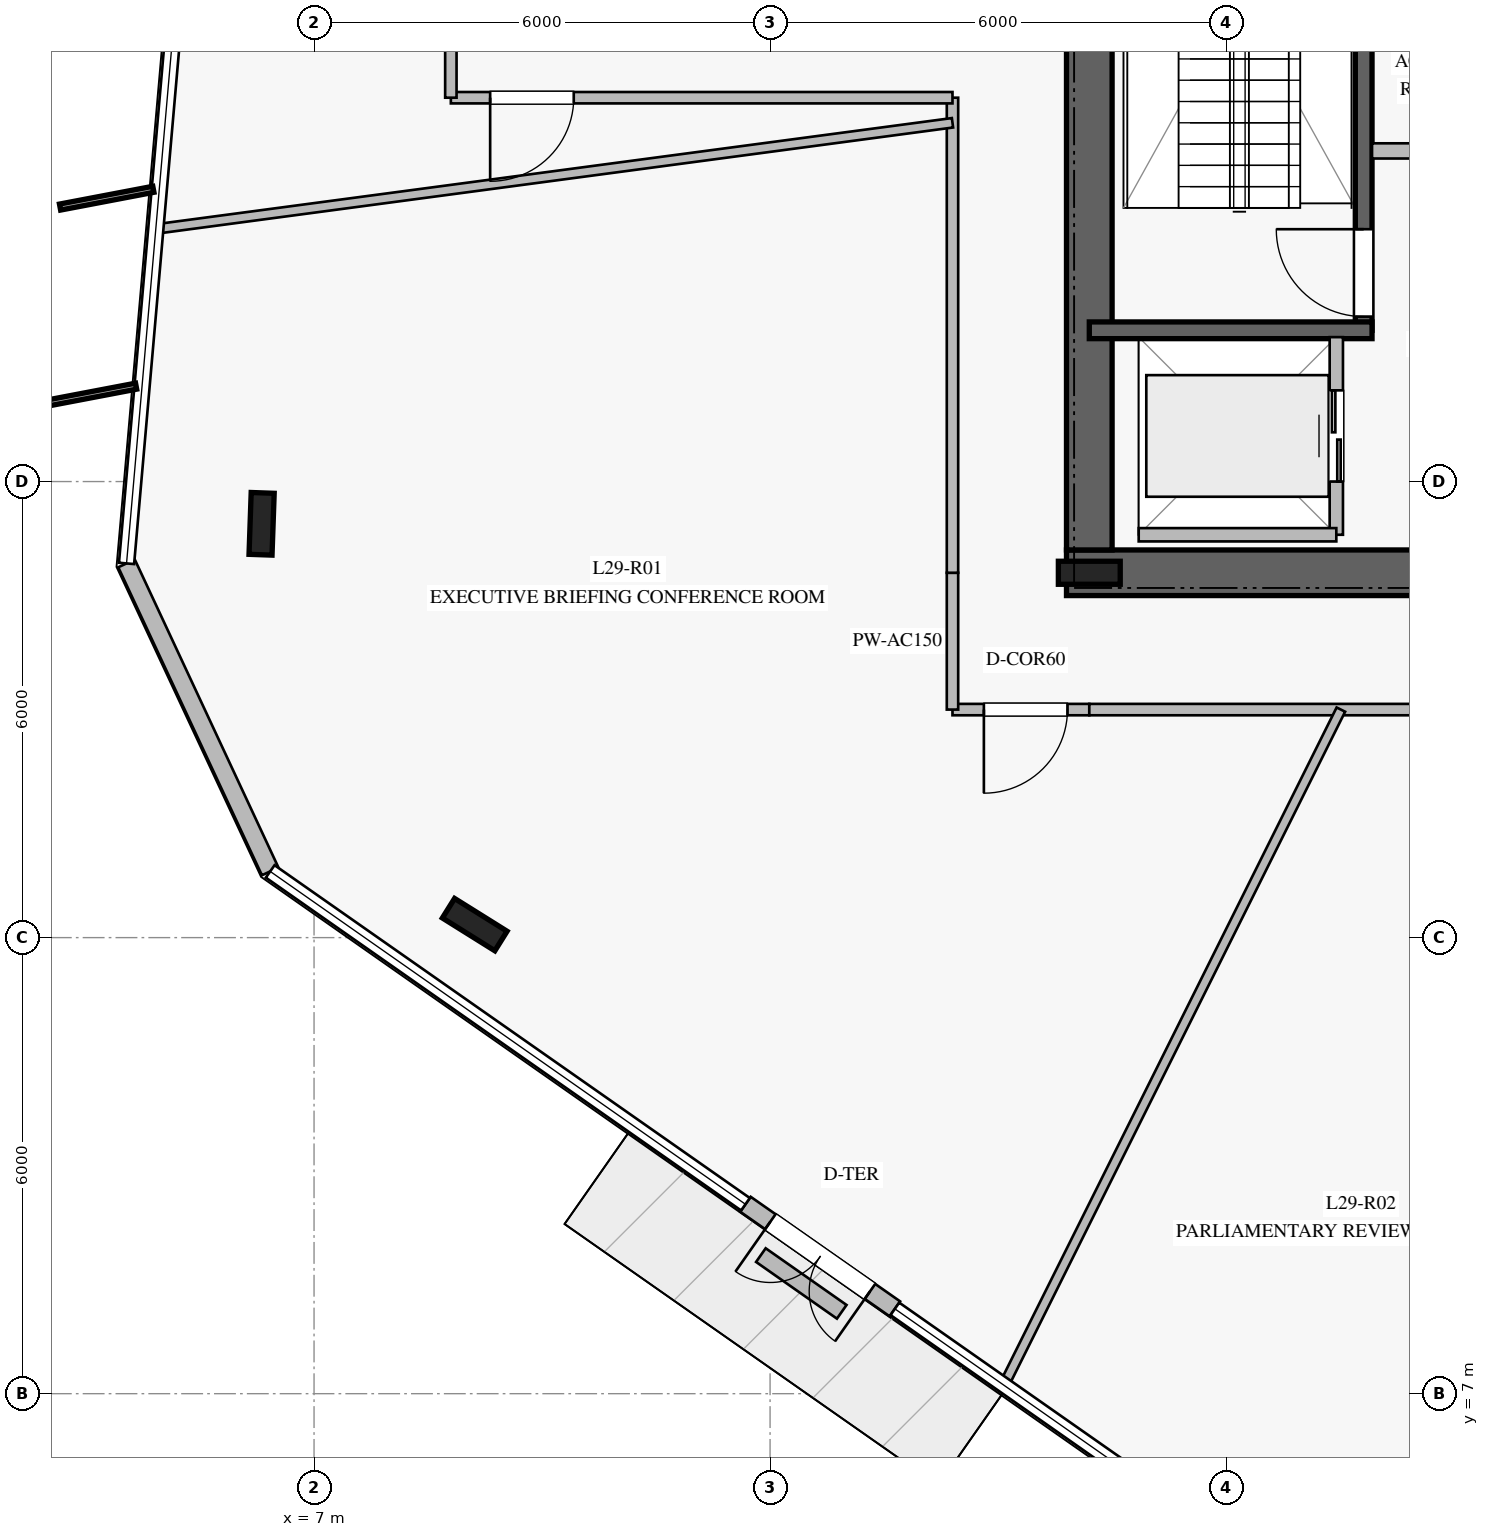
"""IFC4 building model, lengths in metres.
Left out: names, types, materials, properties, quantities, classifications, styles, units other than length and angle.
Written with IfcOpenShell. Run it as: python <this file> out.ifc"""

import sys

from ifc_helpers import new_model, si_unit, direction, frame, frame_2d, origin, origin_2d, place, context, subcontext, project, spatial, rectangle, i_section, extrude, element, fill, save


model = new_model("IFC4")
c1 = context("Model", 3, precision=1e-05, world=origin(), true_north=direction((0.0, 1.0)))
c2 = subcontext(c1, "Body", "Model", "MODEL_VIEW")
j1 = project(units=[si_unit("LENGTHUNIT", "METRE"), si_unit("PLANEANGLEUNIT", "RADIAN")], contexts=[c1])
p1 = place(None, origin())
s1 = spatial("IfcSite", under=j1, at=p1, CompositionType="ELEMENT")
p2 = place(p1, origin())
s2 = spatial("IfcBuilding", under=s1, at=p2, CompositionType="ELEMENT")
p3 = place(p2, frame((0.0, 0.0, 122.4)))
s3 = spatial("IfcBuildingStorey", under=s2, at=p3, CompositionType="ELEMENT", Elevation=122.4)
p4 = place(p3, frame((16.9, 17.8, 0.0), z_axis=(0.0, 0.0, 1.0), x_axis=(1.0, 0.0, 0.0)))
e1 = element("IfcWall", 1, at=p4, inside=s3, PredefinedType="SHEAR", context=c2, shape_type="SweptSolid", body=[
    extrude(rectangle(XDim=16.2, YDim=0.6, at=frame_2d((8.1, 0.0))), origin(), (0.0, 0.0, 1.0), 3.76),
])
p5 = place(p4, frame((5.05, 0.0, 0.0)))
e2 = element("IfcOpeningElement", 2, at=p5, cuts=e1, PredefinedType="OPENING", context=c2, shape_type="SweptSolid", body=[
    extrude(rectangle(XDim=1.2, YDim=2.25, at=frame_2d((0.6, 1.125))), frame((0.0, 0.31, 0.0), z_axis=(0.0, -1.0, 0.0), x_axis=(1.0, 0.0, 0.0)), (0.0, 0.0, 1.0), 0.62),
])
p6 = place(p4, frame((10.95, 0.0, 0.0)))
e3 = element("IfcOpeningElement", 3, at=p6, cuts=e1, PredefinedType="OPENING", context=c2, shape_type="SweptSolid", body=[
    extrude(rectangle(XDim=1.1, YDim=2.2, at=frame_2d((0.55, 1.1))), frame((0.0, 0.31, 0.0), z_axis=(0.0, -1.0, 0.0), x_axis=(1.0, 0.0, 0.0)), (0.0, 0.0, 1.0), 0.62),
])
p7 = place(p3, frame((17.2, 31.9, 0.0), z_axis=(0.0, 0.0, 1.0), x_axis=(0.0, -1.0, 0.0)))
e4 = element("IfcWall", 4, at=p7, inside=s3, PredefinedType="SHEAR", context=c2, shape_type="SweptSolid", body=[
    extrude(rectangle(XDim=13.8, YDim=0.6, at=frame_2d((6.9, 0.0))), origin(), (0.0, 0.0, 1.0), 3.76),
])
p8 = place(p7, frame((2.05, 0.0, 0.0)))
e5 = element("IfcOpeningElement", 5, at=p8, cuts=e4, PredefinedType="OPENING", context=c2, shape_type="SweptSolid", body=[
    extrude(rectangle(XDim=1.5, YDim=2.2, at=frame_2d((0.75, 1.1))), frame((0.0, 0.31, 0.0), z_axis=(0.0, -1.0, 0.0), x_axis=(1.0, 0.0, 0.0)), (0.0, 0.0, 1.0), 0.62),
])
p9 = place(p3, frame((17.2, 17.8, 0.0), z_axis=(0.0, 0.0, 1.0), x_axis=(1.0, 0.0, 0.0)))
e6 = element("IfcColumn", 6, at=p9, inside=s3, PredefinedType="COLUMN", context=c2, shape_type="SweptSolid", body=[
    extrude(i_section(OverallWidth=0.303, OverallDepth=0.814, WebThickness=0.021, FlangeThickness=0.04, at=origin_2d()), origin(), (0.0, 0.0, 1.0), 4.0),
])
p10 = place(p3, frame((20.81, 20.99, 0.0), z_axis=(0.0, 0.0, 1.0), x_axis=(0.0, 1.0, 0.0)))
e7 = element("IfcWall", 7, at=p10, inside=s3, PredefinedType="SOLIDWALL", context=c2, shape_type="SweptSolid", body=[
    extrude(rectangle(XDim=7.22, YDim=0.22, at=frame_2d((3.61, 0.0))), origin(), (0.0, 0.0, 1.0), 3.76),
])
p11 = place(p10, frame((0.18, 0.0, 0.0)))
e8 = element("IfcOpeningElement", 8, at=p11, cuts=e7, PredefinedType="OPENING", context=c2, shape_type="SweptSolid", body=[
    extrude(rectangle(XDim=1.15, YDim=2.2, at=frame_2d((0.575, 1.1))), frame((0.0, 0.12, 0.0), z_axis=(0.0, -1.0, 0.0), x_axis=(1.0, 0.0, 0.0)), (0.0, 0.0, 1.0), 0.24),
])
p12 = place(p3, frame((17.2, 20.99, 0.0), z_axis=(0.0, 0.0, 1.0), x_axis=(1.0, 0.0, 0.0)))
e9 = element("IfcWall", 9, at=p12, inside=s3, PredefinedType="SOLIDWALL", context=c2, shape_type="SweptSolid", body=[
    extrude(rectangle(XDim=3.72, YDim=0.22, at=frame_2d((1.86, 0.0))), origin(), (0.0, 0.0, 1.0), 3.76),
])
for number, where, z_axis, x_axis in (
    (10, (6.31, 18.444, 0.0), (0.0, 0.0, 1.0), (0.035, 0.999, 0.0)),
    (11, (9.114, 13.171, 0.0), (0.0, 0.0, 1.0), (-0.848, 0.53, 0.0)),
):
    element("IfcColumn", number, at=place(p3, frame(where, z_axis=z_axis, x_axis=x_axis)), inside=s3, PredefinedType="COLUMN", context=c2, shape_type="SweptSolid", body=[
        extrude(i_section(OverallWidth=0.303, OverallDepth=0.814, WebThickness=0.021, FlangeThickness=0.04, at=origin_2d()), origin(), (0.0, 0.0, 1.0), 4.0),
    ])
p13 = place(p3, frame((4.533, 17.923, 0.0), z_axis=(0.0, 0.0, 1.0), x_axis=(0.422738987368, -0.906251481962, 0.0)))
e12 = element("IfcWall", 12, at=p13, inside=s3, PredefinedType="STANDARD", context=c2, shape_type="SweptSolid", body=[
    extrude(rectangle(XDim=4.471, YDim=0.24, at=frame_2d((2.236, 0.0))), origin(), (0.0, 0.0, 1.0), 3.76),
])
p14 = place(p3, frame((12.676, 9.492, 0.0), z_axis=(0.0, 0.0, 1.0), x_axis=(0.819284492344, -0.573387234428, 0.0)))
e13 = element("IfcWall", 13, at=p14, inside=s3, PredefinedType="STANDARD", context=c2, shape_type="SweptSolid", body=[
    extrude(rectangle(XDim=2.4, YDim=0.24, at=frame_2d((1.2, 0.0))), origin(), (0.0, 0.0, 1.0), 3.76),
])
p15 = place(p14, frame((0.4, 0.0, 0.0)))
e14 = element("IfcOpeningElement", 14, at=p15, cuts=e13, PredefinedType="OPENING", context=c2, shape_type="SweptSolid", body=[
    extrude(rectangle(XDim=1.6, YDim=2.25, at=frame_2d((0.8, 1.125))), frame((0.0, 0.13, 0.0), z_axis=(0.0, -1.0, 0.0), x_axis=(1.0, 0.0, 0.0)), (0.0, 0.0, 1.0), 0.26),
])
p16 = place(p3, frame((12.879, 8.823, 0.0), z_axis=(0.0, 0.0, 1.0), x_axis=(0.818816934098, -0.574054725993, 0.0)))
e15 = element("IfcWall", 15, at=p16, inside=s3, PredefinedType="USERDEFINED", context=c2, shape_type="SweptSolid", body=[
    extrude(rectangle(XDim=1.3, YDim=0.22, at=frame_2d((0.65, 0.0))), origin(), (0.0, 0.0, 1.0), 0.4),
])
p17 = place(p3, frame((20.92, 23.35, 0.0), z_axis=(0.0, 0.0, 1.0), x_axis=(1.0, 0.0, 0.0)))
e16 = element("IfcWall", 16, at=p17, inside=s3, PredefinedType="PARTITIONING", context=c2, shape_type="SweptSolid", body=[
    extrude(rectangle(XDim=3.38, YDim=0.2, at=frame_2d((1.69, 0.0))), origin(), (0.0, 0.0, 1.0), 3.76),
])
p18 = place(p3, frame((20.45, 18.3, 0.0), z_axis=(0.0, 0.0, 1.0), x_axis=(0.0, 1.0, 0.0)))
e17 = element("IfcWall", 17, at=p18, inside=s3, PredefinedType="PARTITIONING", context=c2, shape_type="SweptSolid", body=[
    extrude(rectangle(XDim=2.6, YDim=0.175, at=frame_2d((1.3, 0.0))), origin(), (0.0, 0.0, 1.0), 3.76),
])
p19 = place(p18, frame((0.7, 0.0, 0.0)))
e18 = element("IfcOpeningElement", 18, at=p19, cuts=e17, PredefinedType="OPENING", context=c2, shape_type="SweptSolid", body=[
    extrude(rectangle(XDim=1.2, YDim=2.2, at=frame_2d((0.6, 1.1))), frame((0.0, 0.098, 0.0), z_axis=(0.0, -1.0, 0.0), x_axis=(1.0, 0.0, 0.0)), (0.0, 0.0, 1.0), 0.195),
])
p20 = place(p3, frame((17.85, 18.3, 0.0), z_axis=(0.0, 0.0, 1.0), x_axis=(1.0, 0.0, 0.0)))
e19 = element("IfcWall", 19, at=p20, inside=s3, PredefinedType="PARTITIONING", context=c2, shape_type="SweptSolid", body=[
    extrude(rectangle(XDim=2.6, YDim=0.175, at=frame_2d((1.3, 0.0))), origin(), (0.0, 0.0, 1.0), 3.76),
])
p21 = place(p3, frame((17.2, 16.0, 0.0), z_axis=(0.0, 0.0, 1.0), x_axis=(-1.0, 0.0, 0.0)))
e20 = element("IfcWall", 20, at=p21, inside=s3, PredefinedType="PARTITIONING", context=c2, shape_type="SweptSolid", body=[
    extrude(rectangle(XDim=1.8, YDim=0.15, at=frame_2d((0.9, 0.0))), origin(), (0.0, 0.0, 1.0), 3.36),
])
p22 = place(p21, frame((0.287, 0.0, 0.0)))
e21 = element("IfcOpeningElement", 21, at=p22, cuts=e20, PredefinedType="OPENING", context=c2, shape_type="SweptSolid", body=[
    extrude(rectangle(XDim=1.1, YDim=2.2, at=frame_2d((0.55, 1.1))), frame((0.0, 0.085, 0.0), z_axis=(0.0, -1.0, 0.0), x_axis=(1.0, 0.0, 0.0)), (0.0, 0.0, 1.0), 0.17),
])
p23 = place(p3, frame((15.4, 16.0, 0.0), z_axis=(0.0, 0.0, 1.0), x_axis=(0.0, 1.0, 0.0)))
e22 = element("IfcWall", 22, at=p23, inside=s3, PredefinedType="PARTITIONING", context=c2, shape_type="SweptSolid", body=[
    extrude(rectangle(XDim=1.8, YDim=0.15, at=frame_2d((0.9, 0.0))), origin(), (0.0, 0.0, 1.0), 3.21),
])
p24 = place(p3, frame((15.4, 17.8, 0.0), z_axis=(0.0, 0.0, 1.0), x_axis=(0.0, 1.0, 0.0)))
e23 = element("IfcWall", 23, at=p24, inside=s3, PredefinedType="PARTITIONING", context=c2, shape_type="SweptSolid", body=[
    extrude(rectangle(XDim=6.25, YDim=0.15, at=frame_2d((3.125, 0.0))), origin(), (0.0, 0.0, 1.0), 3.21),
])
p25 = place(p3, frame((15.4, 24.05, 0.0), z_axis=(0.0, 0.0, 1.0), x_axis=(-1.0, 0.0, 0.0)))
e24 = element("IfcWall", 24, at=p25, inside=s3, PredefinedType="PARTITIONING", context=c2, shape_type="SweptSolid", body=[
    extrude(rectangle(XDim=6.6, YDim=0.15, at=frame_2d((3.3, 0.0))), origin(), (0.0, 0.0, 1.0), 3.05),
])
p26 = place(p25, frame((4.983, 0.0, 0.0)))
e25 = element("IfcOpeningElement", 25, at=p26, cuts=e24, PredefinedType="OPENING", context=c2, shape_type="SweptSolid", body=[
    extrude(rectangle(XDim=1.1, YDim=2.2, at=frame_2d((0.55, 1.1))), frame((0.0, 0.085, 0.0), z_axis=(0.0, -1.0, 0.0), x_axis=(1.0, 0.0, 0.0)), (0.0, 0.0, 1.0), 0.17),
])
p27 = place(p3, frame((8.8, 24.05, 0.0), z_axis=(0.0, 0.0, 1.0), x_axis=(0.0, 1.0, 0.0)))
e26 = element("IfcWall", 26, at=p27, inside=s3, PredefinedType="PARTITIONING", context=c2, shape_type="SweptSolid", body=[
    extrude(rectangle(XDim=1.9, YDim=0.15, at=frame_2d((0.95, 0.0))), origin(), (0.0, 0.0, 1.0), 3.3),
])
p28 = place(p3, frame((24.05, 16.0, 0.0), z_axis=(0.0, 0.0, 1.0), x_axis=(-1.0, 0.0, 0.0)))
e27 = element("IfcWall", 27, at=p28, inside=s3, PredefinedType="PARTITIONING", context=c2, shape_type="SweptSolid", body=[
    extrude(rectangle(XDim=6.85, YDim=0.15, at=frame_2d((3.425, 0.0))), origin(), (0.0, 0.0, 1.0), 3.21),
])
p29 = place(p3, frame((15.4, 23.72, 0.0), z_axis=(0.0, 0.0, 1.0), x_axis=(-0.991229920406, -0.132148571283, 0.0)))
e28 = element("IfcWall", 28, at=p29, inside=s3, PredefinedType="PARTITIONING", context=c2, shape_type="SweptSolid", body=[
    extrude(rectangle(XDim=10.556, YDim=0.125, at=frame_2d((5.278, 0.0))), origin(), (0.0, 0.0, 1.0), 3.05),
])
p30 = place(p3, frame((20.51, 16.0, 0.0), z_axis=(0.0, 0.0, 1.0), x_axis=(-0.446366409245, -0.894850282839, 0.0)))
e29 = element("IfcWall", 29, at=p30, inside=s3, PredefinedType="PARTITIONING", context=c2, shape_type="SweptSolid", body=[
    extrude(rectangle(XDim=9.916, YDim=0.125, at=frame_2d((4.958, 0.0))), origin(), (0.0, 0.0, 1.0), 3.16),
])
p31 = place(p15, frame((1.6, 0.0, 0.0), z_axis=(0.0, 0.0, 1.0), x_axis=(-1.0, 0.0, 0.0)))
e30 = element("IfcDoor", 30, at=p31, inside=s3, OperationType="DOUBLE_DOOR_SINGLE_SWING", PredefinedType="DOOR", context=c2, shape_type="SweptSolid", body=[
    extrude(rectangle(XDim=1.6, YDim=2.25, at=frame_2d((0.8, 1.125))), frame((0.0, 0.025, 0.0), z_axis=(0.0, -1.0, 0.0), x_axis=(1.0, 0.0, 0.0)), (0.0, 0.0, 1.0), 0.05),
])
fill(e14, e30)
p32 = place(p11, origin())
e31 = element("IfcDoor", 31, at=p32, inside=s3, OperationType="SINGLE_SWING_RIGHT", PredefinedType="DOOR", context=c2, shape_type="SweptSolid", body=[
    extrude(rectangle(XDim=1.15, YDim=2.2, at=frame_2d((0.575, 1.1))), frame((0.0, 0.025, 0.0), z_axis=(0.0, -1.0, 0.0), x_axis=(1.0, 0.0, 0.0)), (0.0, 0.0, 1.0), 0.05),
])
fill(e8, e31)
p33 = place(p19, origin())
e32 = element("IfcDoor", 32, at=p33, inside=s3, OperationType="DOUBLE_DOOR_SLIDING", PredefinedType="DOOR", context=c2, shape_type="SweptSolid", body=[
    extrude(rectangle(XDim=1.2, YDim=2.2, at=frame_2d((0.6, 1.1))), frame((0.0, 0.025, 0.0), z_axis=(0.0, -1.0, 0.0), x_axis=(1.0, 0.0, 0.0)), (0.0, 0.0, 1.0), 0.05),
])
fill(e18, e32)
p34 = place(p22, origin())
e33 = element("IfcDoor", 33, at=p34, inside=s3, OperationType="SINGLE_SWING_RIGHT", PredefinedType="DOOR", context=c2, shape_type="SweptSolid", body=[
    extrude(rectangle(XDim=1.1, YDim=2.2, at=frame_2d((0.55, 1.1))), frame((0.0, 0.025, 0.0), z_axis=(0.0, -1.0, 0.0), x_axis=(1.0, 0.0, 0.0)), (0.0, 0.0, 1.0), 0.05),
])
fill(e21, e33)
p35 = place(p26, origin())
e34 = element("IfcDoor", 34, at=p35, inside=s3, OperationType="SINGLE_SWING_RIGHT", PredefinedType="DOOR", context=c2, shape_type="SweptSolid", body=[
    extrude(rectangle(XDim=1.1, YDim=2.2, at=frame_2d((0.55, 1.1))), frame((0.0, 0.025, 0.0), z_axis=(0.0, -1.0, 0.0), x_axis=(1.0, 0.0, 0.0)), (0.0, 0.0, 1.0), 0.05),
])
fill(e25, e34)
save(model, sys.argv[1])
